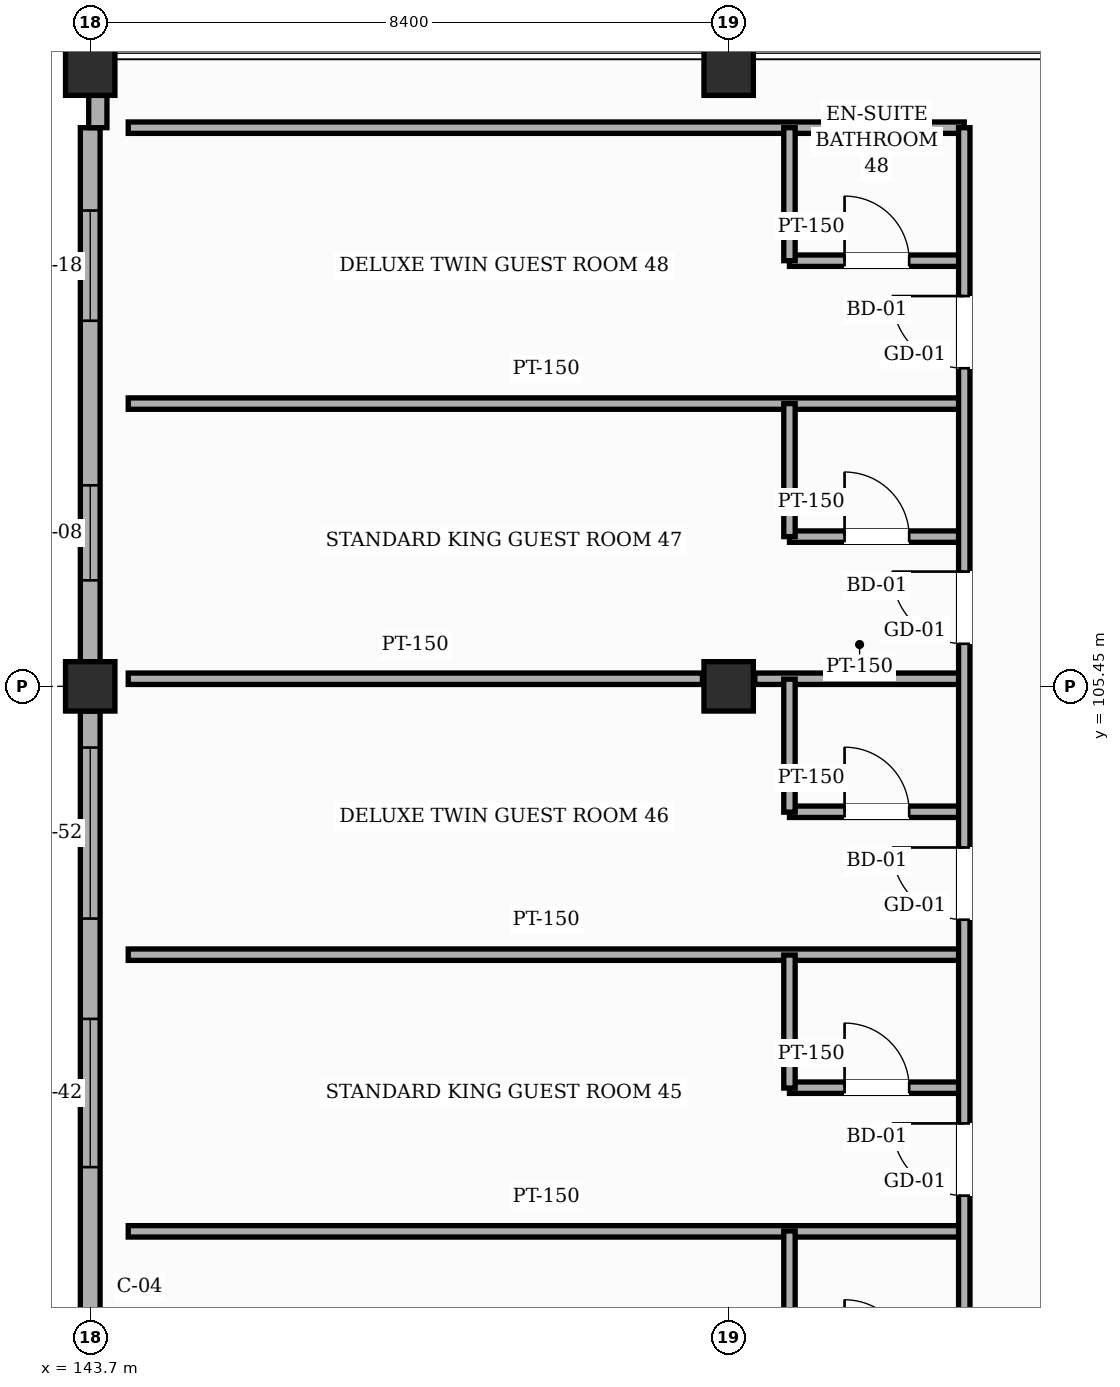
"""IFC4 building model, lengths in metres.
Left out: names, types, materials, properties, quantities, classifications, styles, units other than length and angle.
Written with IfcOpenShell. Run it as: python <this file> out.ifc"""

import sys

from ifc_helpers import new_model, si_unit, direction, frame, frame_2d, origin, origin_2d, place, context, subcontext, project, spatial, rectangle, hollow_rectangle, extrude, element, fill, save


model = new_model("IFC4")
c1 = context("Model", 3, precision=1e-05, world=origin(), true_north=direction((0.0, 1.0)))
c2 = subcontext(c1, "Body", "Model", "MODEL_VIEW")
j1 = project(units=[si_unit("LENGTHUNIT", "METRE"), si_unit("PLANEANGLEUNIT", "RADIAN")], contexts=[c1])
p1 = place(None, origin())
s1 = spatial("IfcSite", under=j1, at=p1, CompositionType="ELEMENT")
p2 = place(p1, origin())
s2 = spatial("IfcBuilding", under=s1, at=p2, CompositionType="ELEMENT")
p3 = place(p2, frame((0.0, 0.0, 19.8)))
s3 = spatial("IfcBuildingStorey", under=s2, at=p3, CompositionType="ELEMENT", Elevation=19.8)
p4 = place(p3, frame((143.7, 105.45, 0.0), z_axis=(0.0, 0.0, 1.0), x_axis=(1.0, 0.0, 0.0)))
e1 = element("IfcColumn", 1, at=p4, inside=s3, PredefinedType="COLUMN", context=c2, shape_type="SweptSolid", body=[
    extrude(hollow_rectangle(XDim=0.65, YDim=0.65, WallThickness=0.025, InnerFilletRadius=0.025, OuterFilletRadius=0.05, at=origin_2d()), origin(), (0.0, 0.0, 1.0), 4.8),
])
p5 = place(p3, frame((143.7, 113.55, 0.0), z_axis=(0.0, 0.0, 1.0), x_axis=(1.0, 0.0, 0.0)))
e2 = element("IfcColumn", 2, at=p5, inside=s3, PredefinedType="COLUMN", context=c2, shape_type="SweptSolid", body=[
    extrude(hollow_rectangle(XDim=0.65, YDim=0.65, WallThickness=0.025, InnerFilletRadius=0.025, OuterFilletRadius=0.05, at=origin_2d()), origin(), (0.0, 0.0, 1.0), 4.58),
])
p6 = place(p3, frame((152.1, 105.45, 0.0), z_axis=(0.0, 0.0, 1.0), x_axis=(1.0, 0.0, 0.0)))
e3 = element("IfcColumn", 3, at=p6, inside=s3, PredefinedType="COLUMN", context=c2, shape_type="SweptSolid", body=[
    extrude(hollow_rectangle(XDim=0.65, YDim=0.65, WallThickness=0.025, InnerFilletRadius=0.025, OuterFilletRadius=0.05, at=origin_2d()), origin(), (0.0, 0.0, 1.0), 4.8),
])
p7 = place(p3, frame((152.1, 113.55, 0.0), z_axis=(0.0, 0.0, 1.0), x_axis=(1.0, 0.0, 0.0)))
e4 = element("IfcColumn", 4, at=p7, inside=s3, PredefinedType="COLUMN", context=c2, shape_type="SweptSolid", body=[
    extrude(hollow_rectangle(XDim=0.65, YDim=0.65, WallThickness=0.025, InnerFilletRadius=0.025, OuterFilletRadius=0.05, at=origin_2d()), origin(), (0.0, 0.0, 1.0), 4.58),
])
p8 = place(p3, frame((143.7, 97.225, 0.0), z_axis=(0.0, 0.0, 1.0), x_axis=(0.0, 1.0, 0.0)))
e5 = element("IfcWall", 5, at=p8, inside=s3, PredefinedType="SOLIDWALL", context=c2, shape_type="SweptSolid", body=[
    extrude(rectangle(XDim=7.9, YDim=0.26, at=frame_2d((3.95, 0.0))), origin(), (0.0, 0.0, 1.0), 3.855),
])
p9 = place(p8, frame((1.9, 0.0, 0.85)))
e6 = element("IfcOpeningElement", 6, at=p9, cuts=e5, PredefinedType="OPENING", context=c2, shape_type="SweptSolid", body=[
    extrude(rectangle(XDim=1.95, YDim=1.5, at=frame_2d((0.975, 0.75))), frame((0.0, 0.14, 0.0), z_axis=(0.0, -1.0, 0.0), x_axis=(1.0, 0.0, 0.0)), (0.0, 0.0, 1.0), 0.28),
])
p10 = place(p8, frame((5.17, 0.0, 0.85)))
e7 = element("IfcOpeningElement", 7, at=p10, cuts=e5, PredefinedType="OPENING", context=c2, shape_type="SweptSolid", body=[
    extrude(rectangle(XDim=2.25, YDim=1.5, at=frame_2d((1.125, 0.75))), frame((0.0, 0.14, 0.0), z_axis=(0.0, -1.0, 0.0), x_axis=(1.0, 0.0, 0.0)), (0.0, 0.0, 1.0), 0.28),
])
p11 = place(p3, frame((143.7, 105.775, 0.0), z_axis=(0.0, 0.0, 1.0), x_axis=(0.0, 1.0, 0.0)))
e8 = element("IfcWall", 8, at=p11, inside=s3, PredefinedType="SOLIDWALL", context=c2, shape_type="SweptSolid", body=[
    extrude(rectangle(XDim=7.025, YDim=0.26, at=frame_2d((3.513, 0.0))), origin(), (0.0, 0.0, 1.0), 4.005),
])
p12 = place(p11, frame((1.07, 0.0, 0.85)))
e9 = element("IfcOpeningElement", 9, at=p12, cuts=e8, PredefinedType="OPENING", context=c2, shape_type="SweptSolid", body=[
    extrude(rectangle(XDim=1.25, YDim=1.65, at=frame_2d((0.625, 0.825))), frame((0.0, 0.14, 0.0), z_axis=(0.0, -1.0, 0.0), x_axis=(1.0, 0.0, 0.0)), (0.0, 0.0, 1.0), 0.28),
])
p13 = place(p11, frame((4.485, 0.0, 0.85)))
e10 = element("IfcOpeningElement", 10, at=p13, cuts=e8, PredefinedType="OPENING", context=c2, shape_type="SweptSolid", body=[
    extrude(rectangle(XDim=1.45, YDim=1.65, at=frame_2d((0.725, 0.825))), frame((0.0, 0.14, 0.0), z_axis=(0.0, -1.0, 0.0), x_axis=(1.0, 0.0, 0.0)), (0.0, 0.0, 1.0), 0.28),
])
p14 = place(p3, frame((143.8, 112.8, 0.0), z_axis=(0.0, 0.0, 1.0), x_axis=(0.0, 1.0, 0.0)))
e11 = element("IfcWall", 11, at=p14, inside=s3, PredefinedType="SOLIDWALL", context=c2, shape_type="SweptSolid", body=[
    extrude(rectangle(XDim=0.425, YDim=0.24, at=frame_2d((0.212, 0.0))), origin(), (0.0, 0.0, 1.0), 4.005),
])
p15 = place(p3, frame((143.8, 113.64, 0.0), z_axis=(0.0, 0.0, 1.0), x_axis=(0.0, 1.0, 0.0)))
e12 = element("IfcWall", 12, at=p15, inside=s3, PredefinedType="SOLIDWALL", context=c2, shape_type="SweptSolid", body=[
    extrude(rectangle(XDim=0.36, YDim=0.24, at=frame_2d((0.18, 0.0))), origin(), (0.0, 0.0, 1.0), 4.565),
])
p16 = place(p3, frame((144.2, 98.28, 0.0), z_axis=(0.0, 0.0, 1.0), x_axis=(1.0, 0.0, 0.0)))
e13 = element("IfcWall", 13, at=p16, inside=s3, PredefinedType="PARTITIONING", context=c2, shape_type="SweptSolid", body=[
    extrude(rectangle(XDim=11.0, YDim=0.15, at=frame_2d((5.5, 0.0))), origin(), (0.0, 0.0, 1.0), 4.565),
])
p17 = place(p3, frame((152.9, 100.17, 0.0), z_axis=(0.0, 0.0, 1.0), x_axis=(1.0, 0.0, 0.0)))
e14 = element("IfcWall", 14, at=p17, inside=s3, PredefinedType="PARTITIONING", context=c2, shape_type="SweptSolid", body=[
    extrude(rectangle(XDim=2.3, YDim=0.15, at=frame_2d((1.15, 0.0))), origin(), (0.0, 0.0, 1.0), 4.565),
])
p18 = place(p17, frame((0.725, 0.0, 0.0)))
e15 = element("IfcOpeningElement", 15, at=p18, cuts=e14, PredefinedType="OPENING", context=c2, shape_type="SweptSolid", body=[
    extrude(rectangle(XDim=0.85, YDim=2.1, at=frame_2d((0.425, 1.05))), frame((0.0, 0.085, 0.0), z_axis=(0.0, -1.0, 0.0), x_axis=(1.0, 0.0, 0.0)), (0.0, 0.0, 1.0), 0.17),
])
p19 = place(p3, frame((144.2, 101.92, 0.0), z_axis=(0.0, 0.0, 1.0), x_axis=(1.0, 0.0, 0.0)))
e16 = element("IfcWall", 16, at=p19, inside=s3, PredefinedType="PARTITIONING", context=c2, shape_type="SweptSolid", body=[
    extrude(rectangle(XDim=11.0, YDim=0.15, at=frame_2d((5.5, 0.0))), origin(), (0.0, 0.0, 1.0), 4.565),
])
p20 = place(p3, frame((152.9, 103.8, 0.0), z_axis=(0.0, 0.0, 1.0), x_axis=(1.0, 0.0, 0.0)))
e17 = element("IfcWall", 17, at=p20, inside=s3, PredefinedType="PARTITIONING", context=c2, shape_type="SweptSolid", body=[
    extrude(rectangle(XDim=2.3, YDim=0.15, at=frame_2d((1.15, 0.0))), origin(), (0.0, 0.0, 1.0), 4.565),
])
p21 = place(p20, frame((0.725, 0.0, 0.0)))
e18 = element("IfcOpeningElement", 18, at=p21, cuts=e17, PredefinedType="OPENING", context=c2, shape_type="SweptSolid", body=[
    extrude(rectangle(XDim=0.85, YDim=2.1, at=frame_2d((0.425, 1.05))), frame((0.0, 0.085, 0.0), z_axis=(0.0, -1.0, 0.0), x_axis=(1.0, 0.0, 0.0)), (0.0, 0.0, 1.0), 0.17),
])
p22 = place(p3, frame((144.2, 105.55, 0.0), z_axis=(0.0, 0.0, 1.0), x_axis=(1.0, 0.0, 0.0)))
e19 = element("IfcWall", 19, at=p22, inside=s3, PredefinedType="PARTITIONING", context=c2, shape_type="SweptSolid", body=[
    extrude(rectangle(XDim=7.555, YDim=0.15, at=frame_2d((3.777, 0.0))), origin(), (0.0, 0.0, 1.0), 3.905),
])
p23 = place(p3, frame((152.445, 105.55, 0.0), z_axis=(0.0, 0.0, 1.0), x_axis=(1.0, 0.0, 0.0)))
e20 = element("IfcWall", 20, at=p23, inside=s3, PredefinedType="PARTITIONING", context=c2, shape_type="SweptSolid", body=[
    extrude(rectangle(XDim=2.755, YDim=0.15, at=frame_2d((1.377, 0.0))), origin(), (0.0, 0.0, 1.0), 3.905),
])
p24 = place(p3, frame((152.9, 107.42, 0.0), z_axis=(0.0, 0.0, 1.0), x_axis=(1.0, 0.0, 0.0)))
e21 = element("IfcWall", 21, at=p24, inside=s3, PredefinedType="PARTITIONING", context=c2, shape_type="SweptSolid", body=[
    extrude(rectangle(XDim=2.3, YDim=0.15, at=frame_2d((1.15, 0.0))), origin(), (0.0, 0.0, 1.0), 4.565),
])
p25 = place(p24, frame((0.725, 0.0, 0.0)))
e22 = element("IfcOpeningElement", 22, at=p25, cuts=e21, PredefinedType="OPENING", context=c2, shape_type="SweptSolid", body=[
    extrude(rectangle(XDim=0.85, YDim=2.1, at=frame_2d((0.425, 1.05))), frame((0.0, 0.085, 0.0), z_axis=(0.0, -1.0, 0.0), x_axis=(1.0, 0.0, 0.0)), (0.0, 0.0, 1.0), 0.17),
])
p26 = place(p3, frame((144.2, 109.17, 0.0), z_axis=(0.0, 0.0, 1.0), x_axis=(1.0, 0.0, 0.0)))
e23 = element("IfcWall", 23, at=p26, inside=s3, PredefinedType="PARTITIONING", context=c2, shape_type="SweptSolid", body=[
    extrude(rectangle(XDim=11.0, YDim=0.15, at=frame_2d((5.5, 0.0))), origin(), (0.0, 0.0, 1.0), 4.565),
])
p27 = place(p3, frame((152.9, 111.05, 0.0), z_axis=(0.0, 0.0, 1.0), x_axis=(1.0, 0.0, 0.0)))
e24 = element("IfcWall", 24, at=p27, inside=s3, PredefinedType="PARTITIONING", context=c2, shape_type="SweptSolid", body=[
    extrude(rectangle(XDim=2.3, YDim=0.15, at=frame_2d((1.15, 0.0))), origin(), (0.0, 0.0, 1.0), 4.565),
])
p28 = place(p27, frame((0.725, 0.0, 0.0)))
e25 = element("IfcOpeningElement", 25, at=p28, cuts=e24, PredefinedType="OPENING", context=c2, shape_type="SweptSolid", body=[
    extrude(rectangle(XDim=0.85, YDim=2.1, at=frame_2d((0.425, 1.05))), frame((0.0, 0.085, 0.0), z_axis=(0.0, -1.0, 0.0), x_axis=(1.0, 0.0, 0.0)), (0.0, 0.0, 1.0), 0.17),
])
p29 = place(p3, frame((144.2, 112.8, 0.0), z_axis=(0.0, 0.0, 1.0), x_axis=(1.0, 0.0, 0.0)))
e26 = element("IfcWall", 26, at=p29, inside=s3, PredefinedType="PARTITIONING", context=c2, shape_type="SweptSolid", body=[
    extrude(rectangle(XDim=11.0, YDim=0.15, at=frame_2d((5.5, 0.0))), origin(), (0.0, 0.0, 1.0), 4.565),
])
for number, where, z_axis, x_axis in (
    (27, (152.9, 96.535, 0.0), (0.0, 0.0, 1.0), (0.0, 1.0, 0.0)),
    (28, (152.9, 100.165, 0.0), (0.0, 0.0, 1.0), (0.0, 1.0, 0.0)),
    (29, (152.9, 103.795, 0.0), (0.0, 0.0, 1.0), (0.0, 1.0, 0.0)),
    (30, (152.9, 107.42, 0.0), (0.0, 0.0, 1.0), (0.0, 1.0, 0.0)),
    (31, (152.9, 111.05, 0.0), (0.0, 0.0, 1.0), (0.0, 1.0, 0.0)),
):
    element("IfcWall", number, at=place(p3, frame(where, z_axis=z_axis, x_axis=x_axis)), inside=s3, PredefinedType="PARTITIONING", context=c2, shape_type="SweptSolid", body=[
        extrude(rectangle(XDim=1.75, YDim=0.15, at=frame_2d((0.875, 0.0))), origin(), (0.0, 0.0, 1.0), 4.565),
    ])
p30 = place(p3, frame((155.2, 62.0, 0.0), z_axis=(0.0, 0.0, 1.0), x_axis=(0.0, 1.0, 0.0)))
e32 = element("IfcWall", 32, at=p30, inside=s3, PredefinedType="PARTITIONING", context=c2, shape_type="SweptSolid", body=[
    extrude(rectangle(XDim=50.8, YDim=0.15, at=frame_2d((25.4, 0.0))), origin(), (0.0, 0.0, 1.0), 4.565),
])
p31 = place(p30, frame((0.465, 0.0, 0.0)))
e33 = element("IfcOpeningElement", 33, at=p31, cuts=e32, PredefinedType="OPENING", context=c2, shape_type="SweptSolid", body=[
    extrude(rectangle(XDim=0.95, YDim=2.15, at=frame_2d((0.475, 1.075))), frame((0.0, 0.085, 0.0), z_axis=(0.0, -1.0, 0.0), x_axis=(1.0, 0.0, 0.0)), (0.0, 0.0, 1.0), 0.17),
])
p32 = place(p30, frame((4.09, 0.0, 0.0)))
e34 = element("IfcOpeningElement", 34, at=p32, cuts=e32, PredefinedType="OPENING", context=c2, shape_type="SweptSolid", body=[
    extrude(rectangle(XDim=0.95, YDim=2.15, at=frame_2d((0.475, 1.075))), frame((0.0, 0.085, 0.0), z_axis=(0.0, -1.0, 0.0), x_axis=(1.0, 0.0, 0.0)), (0.0, 0.0, 1.0), 0.17),
])
p33 = place(p30, frame((7.72, 0.0, 0.0)))
e35 = element("IfcOpeningElement", 35, at=p33, cuts=e32, PredefinedType="OPENING", context=c2, shape_type="SweptSolid", body=[
    extrude(rectangle(XDim=0.95, YDim=2.15, at=frame_2d((0.475, 1.075))), frame((0.0, 0.085, 0.0), z_axis=(0.0, -1.0, 0.0), x_axis=(1.0, 0.0, 0.0)), (0.0, 0.0, 1.0), 0.17),
])
p34 = place(p30, frame((11.35, 0.0, 0.0)))
e36 = element("IfcOpeningElement", 36, at=p34, cuts=e32, PredefinedType="OPENING", context=c2, shape_type="SweptSolid", body=[
    extrude(rectangle(XDim=0.95, YDim=2.15, at=frame_2d((0.475, 1.075))), frame((0.0, 0.085, 0.0), z_axis=(0.0, -1.0, 0.0), x_axis=(1.0, 0.0, 0.0)), (0.0, 0.0, 1.0), 0.17),
])
p35 = place(p30, frame((14.98, 0.0, 0.0)))
e37 = element("IfcOpeningElement", 37, at=p35, cuts=e32, PredefinedType="OPENING", context=c2, shape_type="SweptSolid", body=[
    extrude(rectangle(XDim=0.95, YDim=2.15, at=frame_2d((0.475, 1.075))), frame((0.0, 0.085, 0.0), z_axis=(0.0, -1.0, 0.0), x_axis=(1.0, 0.0, 0.0)), (0.0, 0.0, 1.0), 0.17),
])
p36 = place(p30, frame((18.61, 0.0, 0.0)))
e38 = element("IfcOpeningElement", 38, at=p36, cuts=e32, PredefinedType="OPENING", context=c2, shape_type="SweptSolid", body=[
    extrude(rectangle(XDim=0.95, YDim=2.15, at=frame_2d((0.475, 1.075))), frame((0.0, 0.085, 0.0), z_axis=(0.0, -1.0, 0.0), x_axis=(1.0, 0.0, 0.0)), (0.0, 0.0, 1.0), 0.17),
])
p37 = place(p30, frame((22.235, 0.0, 0.0)))
e39 = element("IfcOpeningElement", 39, at=p37, cuts=e32, PredefinedType="OPENING", context=c2, shape_type="SweptSolid", body=[
    extrude(rectangle(XDim=0.95, YDim=2.15, at=frame_2d((0.475, 1.075))), frame((0.0, 0.085, 0.0), z_axis=(0.0, -1.0, 0.0), x_axis=(1.0, 0.0, 0.0)), (0.0, 0.0, 1.0), 0.17),
])
p38 = place(p30, frame((25.865, 0.0, 0.0)))
e40 = element("IfcOpeningElement", 40, at=p38, cuts=e32, PredefinedType="OPENING", context=c2, shape_type="SweptSolid", body=[
    extrude(rectangle(XDim=0.95, YDim=2.15, at=frame_2d((0.475, 1.075))), frame((0.0, 0.085, 0.0), z_axis=(0.0, -1.0, 0.0), x_axis=(1.0, 0.0, 0.0)), (0.0, 0.0, 1.0), 0.17),
])
p39 = place(p30, frame((29.49, 0.0, 0.0)))
e41 = element("IfcOpeningElement", 41, at=p39, cuts=e32, PredefinedType="OPENING", context=c2, shape_type="SweptSolid", body=[
    extrude(rectangle(XDim=0.95, YDim=2.15, at=frame_2d((0.475, 1.075))), frame((0.0, 0.085, 0.0), z_axis=(0.0, -1.0, 0.0), x_axis=(1.0, 0.0, 0.0)), (0.0, 0.0, 1.0), 0.17),
])
p40 = place(p30, frame((33.12, 0.0, 0.0)))
e42 = element("IfcOpeningElement", 42, at=p40, cuts=e32, PredefinedType="OPENING", context=c2, shape_type="SweptSolid", body=[
    extrude(rectangle(XDim=0.95, YDim=2.15, at=frame_2d((0.475, 1.075))), frame((0.0, 0.085, 0.0), z_axis=(0.0, -1.0, 0.0), x_axis=(1.0, 0.0, 0.0)), (0.0, 0.0, 1.0), 0.17),
])
p41 = place(p30, frame((36.75, 0.0, 0.0)))
e43 = element("IfcOpeningElement", 43, at=p41, cuts=e32, PredefinedType="OPENING", context=c2, shape_type="SweptSolid", body=[
    extrude(rectangle(XDim=0.95, YDim=2.15, at=frame_2d((0.475, 1.075))), frame((0.0, 0.085, 0.0), z_axis=(0.0, -1.0, 0.0), x_axis=(1.0, 0.0, 0.0)), (0.0, 0.0, 1.0), 0.17),
])
p42 = place(p30, frame((40.38, 0.0, 0.0)))
e44 = element("IfcOpeningElement", 44, at=p42, cuts=e32, PredefinedType="OPENING", context=c2, shape_type="SweptSolid", body=[
    extrude(rectangle(XDim=0.95, YDim=2.15, at=frame_2d((0.475, 1.075))), frame((0.0, 0.085, 0.0), z_axis=(0.0, -1.0, 0.0), x_axis=(1.0, 0.0, 0.0)), (0.0, 0.0, 1.0), 0.17),
])
p43 = place(p30, frame((44.01, 0.0, 0.0)))
e45 = element("IfcOpeningElement", 45, at=p43, cuts=e32, PredefinedType="OPENING", context=c2, shape_type="SweptSolid", body=[
    extrude(rectangle(XDim=0.95, YDim=2.15, at=frame_2d((0.475, 1.075))), frame((0.0, 0.085, 0.0), z_axis=(0.0, -1.0, 0.0), x_axis=(1.0, 0.0, 0.0)), (0.0, 0.0, 1.0), 0.17),
])
p44 = place(p30, frame((47.635, 0.0, 0.0)))
e46 = element("IfcOpeningElement", 46, at=p44, cuts=e32, PredefinedType="OPENING", context=c2, shape_type="SweptSolid", body=[
    extrude(rectangle(XDim=0.95, YDim=2.15, at=frame_2d((0.475, 1.075))), frame((0.0, 0.085, 0.0), z_axis=(0.0, -1.0, 0.0), x_axis=(1.0, 0.0, 0.0)), (0.0, 0.0, 1.0), 0.17),
])
p45 = place(p9, origin())
e47 = element("IfcWindow", 47, at=p45, inside=s3, PartitioningType="SINGLE_PANEL", PredefinedType="WINDOW", context=c2, shape_type="SweptSolid", body=[
    extrude(rectangle(XDim=1.95, YDim=1.5, at=frame_2d((0.975, 0.75))), frame((0.0, 0.03, 0.0), z_axis=(0.0, -1.0, 0.0), x_axis=(1.0, 0.0, 0.0)), (0.0, 0.0, 1.0), 0.06),
])
fill(e6, e47)
p46 = place(p10, origin())
e48 = element("IfcWindow", 48, at=p46, inside=s3, PartitioningType="SINGLE_PANEL", PredefinedType="WINDOW", context=c2, shape_type="SweptSolid", body=[
    extrude(rectangle(XDim=2.25, YDim=1.5, at=frame_2d((1.125, 0.75))), frame((0.0, 0.03, 0.0), z_axis=(0.0, -1.0, 0.0), x_axis=(1.0, 0.0, 0.0)), (0.0, 0.0, 1.0), 0.06),
])
fill(e7, e48)
p47 = place(p12, origin())
e49 = element("IfcWindow", 49, at=p47, inside=s3, PartitioningType="SINGLE_PANEL", PredefinedType="WINDOW", context=c2, shape_type="SweptSolid", body=[
    extrude(rectangle(XDim=1.25, YDim=1.65, at=frame_2d((0.625, 0.825))), frame((0.0, 0.03, 0.0), z_axis=(0.0, -1.0, 0.0), x_axis=(1.0, 0.0, 0.0)), (0.0, 0.0, 1.0), 0.06),
])
fill(e9, e49)
p48 = place(p13, origin())
e50 = element("IfcWindow", 50, at=p48, inside=s3, PartitioningType="SINGLE_PANEL", PredefinedType="WINDOW", context=c2, shape_type="SweptSolid", body=[
    extrude(rectangle(XDim=1.45, YDim=1.65, at=frame_2d((0.725, 0.825))), frame((0.0, 0.03, 0.0), z_axis=(0.0, -1.0, 0.0), x_axis=(1.0, 0.0, 0.0)), (0.0, 0.0, 1.0), 0.06),
])
fill(e10, e50)
p49 = place(p41, origin())
e51 = element("IfcDoor", 51, at=p49, inside=s3, OperationType="SINGLE_SWING_RIGHT", PredefinedType="DOOR", context=c2, shape_type="SweptSolid", body=[
    extrude(rectangle(XDim=0.95, YDim=2.15, at=frame_2d((0.475, 1.075))), frame((0.0, 0.025, 0.0), z_axis=(0.0, -1.0, 0.0), x_axis=(1.0, 0.0, 0.0)), (0.0, 0.0, 1.0), 0.05),
])
fill(e43, e51)
p50 = place(p18, origin())
e52 = element("IfcDoor", 52, at=p50, inside=s3, OperationType="SINGLE_SWING_LEFT", PredefinedType="DOOR", context=c2, shape_type="SweptSolid", body=[
    extrude(rectangle(XDim=0.85, YDim=2.1, at=frame_2d((0.425, 1.05))), frame((0.0, 0.025, 0.0), z_axis=(0.0, -1.0, 0.0), x_axis=(1.0, 0.0, 0.0)), (0.0, 0.0, 1.0), 0.05),
])
fill(e15, e52)
p51 = place(p42, origin())
e53 = element("IfcDoor", 53, at=p51, inside=s3, OperationType="SINGLE_SWING_RIGHT", PredefinedType="DOOR", context=c2, shape_type="SweptSolid", body=[
    extrude(rectangle(XDim=0.95, YDim=2.15, at=frame_2d((0.475, 1.075))), frame((0.0, 0.025, 0.0), z_axis=(0.0, -1.0, 0.0), x_axis=(1.0, 0.0, 0.0)), (0.0, 0.0, 1.0), 0.05),
])
fill(e44, e53)
p52 = place(p21, origin())
e54 = element("IfcDoor", 54, at=p52, inside=s3, OperationType="SINGLE_SWING_LEFT", PredefinedType="DOOR", context=c2, shape_type="SweptSolid", body=[
    extrude(rectangle(XDim=0.85, YDim=2.1, at=frame_2d((0.425, 1.05))), frame((0.0, 0.025, 0.0), z_axis=(0.0, -1.0, 0.0), x_axis=(1.0, 0.0, 0.0)), (0.0, 0.0, 1.0), 0.05),
])
fill(e18, e54)
p53 = place(p43, origin())
e55 = element("IfcDoor", 55, at=p53, inside=s3, OperationType="SINGLE_SWING_RIGHT", PredefinedType="DOOR", context=c2, shape_type="SweptSolid", body=[
    extrude(rectangle(XDim=0.95, YDim=2.15, at=frame_2d((0.475, 1.075))), frame((0.0, 0.025, 0.0), z_axis=(0.0, -1.0, 0.0), x_axis=(1.0, 0.0, 0.0)), (0.0, 0.0, 1.0), 0.05),
])
fill(e45, e55)
p54 = place(p25, origin())
e56 = element("IfcDoor", 56, at=p54, inside=s3, OperationType="SINGLE_SWING_LEFT", PredefinedType="DOOR", context=c2, shape_type="SweptSolid", body=[
    extrude(rectangle(XDim=0.85, YDim=2.1, at=frame_2d((0.425, 1.05))), frame((0.0, 0.025, 0.0), z_axis=(0.0, -1.0, 0.0), x_axis=(1.0, 0.0, 0.0)), (0.0, 0.0, 1.0), 0.05),
])
fill(e22, e56)
p55 = place(p44, origin())
e57 = element("IfcDoor", 57, at=p55, inside=s3, OperationType="SINGLE_SWING_RIGHT", PredefinedType="DOOR", context=c2, shape_type="SweptSolid", body=[
    extrude(rectangle(XDim=0.95, YDim=2.15, at=frame_2d((0.475, 1.075))), frame((0.0, 0.025, 0.0), z_axis=(0.0, -1.0, 0.0), x_axis=(1.0, 0.0, 0.0)), (0.0, 0.0, 1.0), 0.05),
])
fill(e46, e57)
p56 = place(p28, origin())
e58 = element("IfcDoor", 58, at=p56, inside=s3, OperationType="SINGLE_SWING_LEFT", PredefinedType="DOOR", context=c2, shape_type="SweptSolid", body=[
    extrude(rectangle(XDim=0.85, YDim=2.1, at=frame_2d((0.425, 1.05))), frame((0.0, 0.025, 0.0), z_axis=(0.0, -1.0, 0.0), x_axis=(1.0, 0.0, 0.0)), (0.0, 0.0, 1.0), 0.05),
])
fill(e25, e58)
save(model, sys.argv[1])
